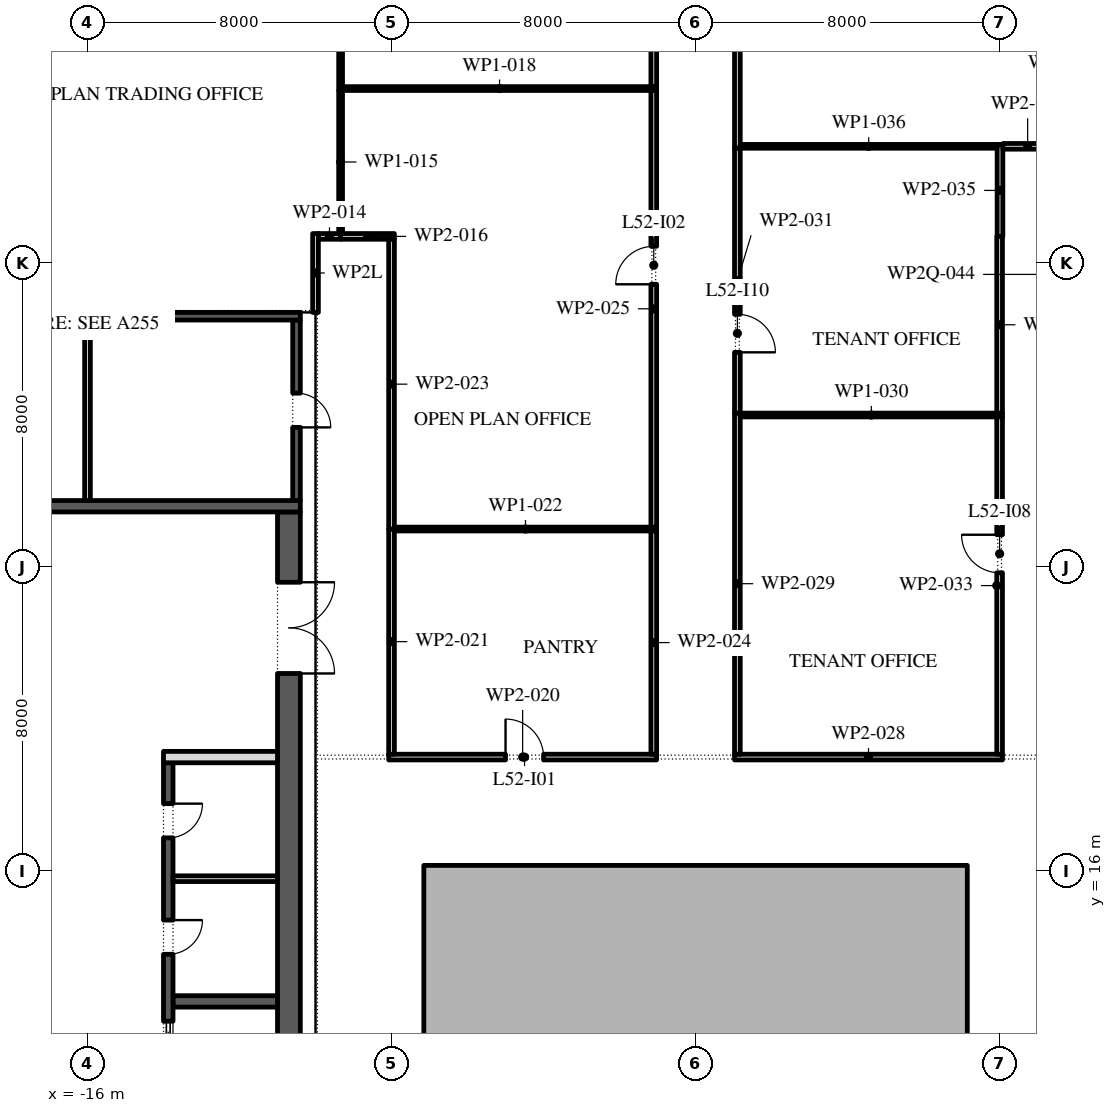
"""IFC4 building model, lengths in metres.
Left out: names, types, materials, properties, quantities, classifications, styles, units other than length and angle.
Written with IfcOpenShell. Run it as: python <this file> out.ifc"""

import sys

from ifc_helpers import new_model, si_unit, direction, frame, frame_2d, origin, place, context, subcontext, project, spatial, polyline, rectangle, outline, extrude, element, fill, save


model = new_model("IFC4")
c1 = context("Model", 3, precision=1e-05, world=origin(), true_north=direction((0.0, 1.0)))
c2 = subcontext(c1, "Body", "Model", "MODEL_VIEW")
j1 = project(units=[si_unit("LENGTHUNIT", "METRE"), si_unit("PLANEANGLEUNIT", "RADIAN")], contexts=[c1])
p1 = place(None, origin())
s1 = spatial("IfcSite", under=j1, at=p1, CompositionType="ELEMENT")
p2 = place(p1, origin())
s2 = spatial("IfcBuilding", under=s1, at=p2, CompositionType="ELEMENT")
p3 = place(p2, frame((0.0, 0.0, 243.0)))
s3 = spatial("IfcBuildingStorey", under=s2, at=p3, CompositionType="ELEMENT", Elevation=243.0)
p4 = place(p3, origin())
e1 = element("IfcWall", 1, at=p4, inside=s3, PredefinedType="STANDARD", context=c2, shape_type="SweptSolid", body=[
    extrude(outline(polyline([(-7.15, -2.15), (7.15, -2.15), (7.15, 16.15), (-7.15, 16.15), (-7.15, -2.15)]), holes=[polyline([(-7.0, -2.0), (-7.0, 16.0), (7.0, 16.0), (7.0, -2.0), (-7.0, -2.0)])]), origin(), (0.0, 0.0, 1.0), 4.0),
])
p5 = place(p3, frame((-10.7, -2.45, 0.0), z_axis=(0.0, 0.0, 1.0), x_axis=(0.0, 1.0, 0.0)))
e2 = element("IfcWall", 2, at=p5, inside=s3, PredefinedType="SHEAR", context=c2, shape_type="SweptSolid", body=[
    extrude(rectangle(XDim=27.9, YDim=0.6, at=frame_2d((13.95, 0.0))), origin(), (0.0, 0.0, 1.0), 4.0),
])
p6 = place(p5, frame((23.65, 0.0, 0.0)))
e3 = element("IfcOpeningElement", 3, at=p6, cuts=e2, PredefinedType="OPENING", context=c2, shape_type="SweptSolid", body=[
    extrude(rectangle(XDim=2.4, YDim=2.1, at=frame_2d((1.2, 1.05))), frame((0.0, 0.31, 0.0), z_axis=(0.0, -1.0, 0.0), x_axis=(1.0, 0.0, 0.0)), (0.0, 0.0, 1.0), 0.62),
])
p7 = place(p5, frame((1.087, 0.0, 0.0)))
e4 = element("IfcOpeningElement", 4, at=p7, cuts=e2, PredefinedType="OPENING", context=c2, shape_type="SweptSolid", body=[
    extrude(rectangle(XDim=0.9, YDim=2.1, at=frame_2d((0.45, 1.05))), frame((0.0, 0.31, 0.0), z_axis=(0.0, -1.0, 0.0), x_axis=(1.0, 0.0, 0.0)), (0.0, 0.0, 1.0), 0.62),
])
p8 = place(p5, frame((4.262, 0.0, 0.0)))
e5 = element("IfcOpeningElement", 5, at=p8, cuts=e2, PredefinedType="OPENING", context=c2, shape_type="SweptSolid", body=[
    extrude(rectangle(XDim=1.0, YDim=2.1, at=frame_2d((0.5, 1.05))), frame((0.0, 0.31, 0.0), z_axis=(0.0, -1.0, 0.0), x_axis=(1.0, 0.0, 0.0)), (0.0, 0.0, 1.0), 0.62),
])
p9 = place(p3, frame((-21.6, 25.6, 0.0), z_axis=(0.0, 0.0, 1.0), x_axis=(1.0, 0.0, 0.0)))
e6 = element("IfcWall", 6, at=p9, inside=s3, PredefinedType="SHEAR", context=c2, shape_type="SweptSolid", body=[
    extrude(rectangle(XDim=11.2, YDim=0.3, at=frame_2d((5.6, 0.0))), origin(), (0.0, 0.0, 1.0), 4.0),
])
p10 = place(p3, frame((-13.75, 12.571, 0.0), z_axis=(0.0, 0.0, 1.0), x_axis=(1.0, 0.0, 0.0)))
e7 = element("IfcWall", 7, at=p10, inside=s3, PredefinedType="SHEAR", context=c2, shape_type="SweptSolid", body=[
    extrude(rectangle(XDim=2.75, YDim=0.3, at=frame_2d((1.375, 0.0))), origin(), (0.0, 0.0, 1.0), 4.0),
])
p11 = place(p3, frame((-13.875, -2.45, 0.0), z_axis=(0.0, 0.0, 1.0), x_axis=(0.0, 1.0, 0.0)))
e8 = element("IfcWall", 8, at=p11, inside=s3, PredefinedType="SHEAR", context=c2, shape_type="SweptSolid", body=[
    extrude(rectangle(XDim=21.3, YDim=0.25, at=frame_2d((10.65, 0.0))), origin(), (0.0, 0.0, 1.0), 4.0),
])
p12 = place(p11, frame((16.261, 0.0, 0.0)))
e9 = element("IfcOpeningElement", 9, at=p12, cuts=e8, PredefinedType="OPENING", context=c2, shape_type="SweptSolid", body=[
    extrude(rectangle(XDim=0.9, YDim=2.1, at=frame_2d((0.45, 1.05))), frame((0.0, 0.135, 0.0), z_axis=(0.0, -1.0, 0.0), x_axis=(1.0, 0.0, 0.0)), (0.0, 0.0, 1.0), 0.27),
])
p13 = place(p11, frame((19.325, 0.0, 0.0)))
e10 = element("IfcOpeningElement", 10, at=p13, cuts=e8, PredefinedType="OPENING", context=c2, shape_type="SweptSolid", body=[
    extrude(rectangle(XDim=0.9, YDim=2.1, at=frame_2d((0.45, 1.05))), frame((0.0, 0.135, 0.0), z_axis=(0.0, -1.0, 0.0), x_axis=(1.0, 0.0, 0.0)), (0.0, 0.0, 1.0), 0.27),
])
p14 = place(p11, frame((6.971, 0.0, 0.0)))
e11 = element("IfcOpeningElement", 11, at=p14, cuts=e8, PredefinedType="OPENING", context=c2, shape_type="SweptSolid", body=[
    extrude(rectangle(XDim=1.1, YDim=2.1, at=frame_2d((0.55, 1.05))), frame((0.0, 0.135, 0.0), z_axis=(0.0, -1.0, 0.0), x_axis=(1.0, 0.0, 0.0)), (0.0, 0.0, 1.0), 0.27),
])
p15 = place(p11, frame((9.114, 0.0, 0.0)))
e12 = element("IfcOpeningElement", 12, at=p15, cuts=e8, PredefinedType="OPENING", context=c2, shape_type="SweptSolid", body=[
    extrude(rectangle(XDim=1.1, YDim=2.1, at=frame_2d((0.55, 1.05))), frame((0.0, 0.135, 0.0), z_axis=(0.0, -1.0, 0.0), x_axis=(1.0, 0.0, 0.0)), (0.0, 0.0, 1.0), 0.27),
])
p16 = place(p11, frame((11.257, 0.0, 0.0)))
e13 = element("IfcOpeningElement", 13, at=p16, cuts=e8, PredefinedType="OPENING", context=c2, shape_type="SweptSolid", body=[
    extrude(rectangle(XDim=1.1, YDim=2.1, at=frame_2d((0.55, 1.05))), frame((0.0, 0.135, 0.0), z_axis=(0.0, -1.0, 0.0), x_axis=(1.0, 0.0, 0.0)), (0.0, 0.0, 1.0), 0.27),
])
p17 = place(p11, frame((13.4, 0.0, 0.0)))
e14 = element("IfcOpeningElement", 14, at=p17, cuts=e8, PredefinedType="OPENING", context=c2, shape_type="SweptSolid", body=[
    extrude(rectangle(XDim=1.1, YDim=2.1, at=frame_2d((0.55, 1.05))), frame((0.0, 0.135, 0.0), z_axis=(0.0, -1.0, 0.0), x_axis=(1.0, 0.0, 0.0)), (0.0, 0.0, 1.0), 0.27),
])
p18 = place(p3, frame((-14.0, 19.0, 0.0), z_axis=(0.0, 0.0, 1.0), x_axis=(1.0, 0.0, 0.0)))
e15 = element("IfcWall", 15, at=p18, inside=s3, PredefinedType="PARTITIONING", context=c2, shape_type="SweptSolid", body=[
    extrude(rectangle(XDim=3.0, YDim=0.3, at=frame_2d((1.5, 0.0))), origin(), (0.0, 0.0, 1.0), 4.0),
])
p19 = place(p3, frame((-13.75, 15.8, 0.0), z_axis=(0.0, 0.0, 1.0), x_axis=(1.0, 0.0, 0.0)))
e16 = element("IfcWall", 16, at=p19, inside=s3, PredefinedType="PARTITIONING", context=c2, shape_type="SweptSolid", body=[
    extrude(rectangle(XDim=2.75, YDim=0.15, at=frame_2d((1.375, 0.0))), origin(), (0.0, 0.0, 1.0), 4.0),
])
p20 = place(p3, frame((-10.5, 25.75, 0.0), z_axis=(0.0, 0.0, 1.0), x_axis=(0.0, 1.0, 0.0)))
e17 = element("IfcWall", 17, at=p20, inside=s3, PredefinedType="SHEAR", context=c2, shape_type="SweptSolid", body=[
    extrude(rectangle(XDim=4.75, YDim=0.2, at=frame_2d((2.375, 0.0))), origin(), (0.0, 0.0, 1.0), 4.0),
])
p21 = place(p20, frame((1.925, 0.0, 0.0)))
e18 = element("IfcOpeningElement", 18, at=p21, cuts=e17, PredefinedType="OPENING", context=c2, shape_type="SweptSolid", body=[
    extrude(rectangle(XDim=0.9, YDim=2.1, at=frame_2d((0.45, 1.05))), frame((0.0, 0.11, 0.0), z_axis=(0.0, -1.0, 0.0), x_axis=(1.0, 0.0, 0.0)), (0.0, 0.0, 1.0), 0.22),
])
p22 = place(p3, frame((-21.6, 30.6, 0.0), z_axis=(0.0, 0.0, 1.0), x_axis=(1.0, 0.0, 0.0)))
e19 = element("IfcWall", 19, at=p22, inside=s3, PredefinedType="SHEAR", context=c2, shape_type="SweptSolid", body=[
    extrude(rectangle(XDim=11.2, YDim=0.2, at=frame_2d((5.6, 0.0))), origin(), (0.0, 0.0, 1.0), 4.0),
])
p23 = place(p3, frame((-16.0, 25.75, 0.0), z_axis=(0.0, 0.0, 1.0), x_axis=(0.0, 1.0, 0.0)))
e20 = element("IfcWall", 20, at=p23, inside=s3, PredefinedType="PARTITIONING", context=c2, shape_type="SweptSolid", body=[
    extrude(rectangle(XDim=4.75, YDim=0.15, at=frame_2d((2.375, 0.0))), origin(), (0.0, 0.0, 1.0), 4.0),
])
p24 = place(p3, frame((-10.0, 30.7, 0.0), z_axis=(0.0, 0.0, 1.0), x_axis=(0.0, 1.0, 0.0)))
e21 = element("IfcWall", 21, at=p24, inside=s3, PredefinedType="PARTITIONING", context=c2, shape_type="SweptSolid", body=[
    extrude(rectangle(XDim=2.075, YDim=0.15, at=frame_2d((1.038, 0.0))), origin(), (0.0, 0.0, 1.0), 3.02),
])
p25 = place(p3, frame((-9.925, 32.7, 0.0), z_axis=(0.0, 0.0, 1.0), x_axis=(1.0, 0.0, 0.0)))
e22 = element("IfcWall", 22, at=p25, inside=s3, PredefinedType="PARTITIONING", context=c2, shape_type="SweptSolid", body=[
    extrude(rectangle(XDim=0.585, YDim=0.15, at=frame_2d((0.292, 0.0))), origin(), (0.0, 0.0, 1.0), 4.0),
])
p26 = place(p3, frame((-9.34, 32.775, 0.0), z_axis=(0.0, 0.0, 1.0), x_axis=(0.0, 1.0, 0.0)))
e23 = element("IfcWall", 23, at=p26, inside=s3, PredefinedType="PARTITIONING", context=c2, shape_type="SweptSolid", body=[
    extrude(rectangle(XDim=3.765, YDim=0.1, at=frame_2d((1.883, 0.0))), origin(), (0.0, 0.0, 1.0), 4.0),
])
p27 = place(p3, frame((-9.34, 32.7, 0.0), z_axis=(0.0, 0.0, 1.0), x_axis=(1.0, 0.0, 0.0)))
e24 = element("IfcWall", 24, at=p27, inside=s3, PredefinedType="PARTITIONING", context=c2, shape_type="SweptSolid", body=[
    extrude(rectangle(XDim=1.415, YDim=0.15, at=frame_2d((0.708, 0.0))), origin(), (0.0, 0.0, 1.0), 4.0),
])
p28 = place(p3, frame((-9.34, 36.54, 0.0), z_axis=(0.0, 0.0, 1.0), x_axis=(0.0, 1.0, 0.0)))
e25 = element("IfcWall", 25, at=p28, inside=s3, PredefinedType="PARTITIONING", context=c2, shape_type="SweptSolid", body=[
    extrude(rectangle(XDim=5.41, YDim=0.1, at=frame_2d((2.705, 0.0))), origin(), (0.0, 0.0, 1.0), 4.0),
])
p29 = place(p3, frame((-9.29, 36.59, 0.0), z_axis=(0.0, 0.0, 1.0), x_axis=(1.0, 0.0, 0.0)))
e26 = element("IfcWall", 26, at=p29, inside=s3, PredefinedType="PARTITIONING", context=c2, shape_type="SweptSolid", body=[
    extrude(rectangle(XDim=8.265, YDim=0.1, at=frame_2d((4.133, 0.0))), origin(), (0.0, 0.0, 1.0), 4.0),
])
p30 = place(p3, frame((-8.075, 19.0, 0.0), z_axis=(0.0, 0.0, 1.0), x_axis=(1.0, 0.0, 0.0)))
e27 = element("IfcWall", 27, at=p30, inside=s3, PredefinedType="PARTITIONING", context=c2, shape_type="SweptSolid", body=[
    extrude(rectangle(XDim=7.05, YDim=0.15, at=frame_2d((3.525, 0.0))), origin(), (0.0, 0.0, 1.0), 4.0),
])
p31 = place(p30, frame((3.075, 0.0, 0.0)))
e28 = element("IfcOpeningElement", 28, at=p31, cuts=e27, PredefinedType="OPENING", context=c2, shape_type="SweptSolid", body=[
    extrude(rectangle(XDim=1.0, YDim=2.1, at=frame_2d((0.5, 1.05))), frame((0.0, 0.085, 0.0), z_axis=(0.0, -1.0, 0.0), x_axis=(1.0, 0.0, 0.0)), (0.0, 0.0, 1.0), 0.17),
])
p32 = place(p3, frame((-8.0, 25.0, 0.0), z_axis=(0.0, 0.0, 1.0), x_axis=(0.0, -1.0, 0.0)))
e29 = element("IfcWall", 29, at=p32, inside=s3, PredefinedType="PARTITIONING", context=c2, shape_type="SweptSolid", body=[
    extrude(rectangle(XDim=5.925, YDim=0.15, at=frame_2d((2.962, 0.0))), origin(), (0.0, 0.0, 1.0), 4.0),
])
p33 = place(p3, frame((-7.925, 25.0, 0.0), z_axis=(0.0, 0.0, 1.0), x_axis=(1.0, 0.0, 0.0)))
e30 = element("IfcWall", 30, at=p33, inside=s3, PredefinedType="PARTITIONING", context=c2, shape_type="SweptSolid", body=[
    extrude(rectangle(XDim=6.9, YDim=0.1, at=frame_2d((3.45, 0.0))), origin(), (0.0, 0.0, 1.0), 4.0),
])
p34 = place(p3, frame((-8.0, 32.625, 0.0), z_axis=(0.0, 0.0, 1.0), x_axis=(0.0, -1.0, 0.0)))
e31 = element("IfcWall", 31, at=p34, inside=s3, PredefinedType="PARTITIONING", context=c2, shape_type="SweptSolid", body=[
    extrude(rectangle(XDim=7.625, YDim=0.15, at=frame_2d((3.812, 0.0))), origin(), (0.0, 0.0, 1.0), 4.0),
])
p35 = place(p3, frame((-1.1, 19.075, 0.0), z_axis=(0.0, 0.0, 1.0), x_axis=(0.0, 1.0, 0.0)))
e32 = element("IfcWall", 32, at=p35, inside=s3, PredefinedType="PARTITIONING", context=c2, shape_type="SweptSolid", body=[
    extrude(rectangle(XDim=5.875, YDim=0.15, at=frame_2d((2.938, 0.0))), origin(), (0.0, 0.0, 1.0), 4.0),
])
p36 = place(p3, frame((-1.1, 25.05, 0.0), z_axis=(0.0, 0.0, 1.0), x_axis=(0.0, 1.0, 0.0)))
e33 = element("IfcWall", 33, at=p36, inside=s3, PredefinedType="PARTITIONING", context=c2, shape_type="SweptSolid", body=[
    extrude(rectangle(XDim=11.49, YDim=0.15, at=frame_2d((5.745, 0.0))), origin(), (0.0, 0.0, 1.0), 4.0),
])
p37 = place(p36, frame((6.39, 0.0, 0.0)))
e34 = element("IfcOpeningElement", 34, at=p37, cuts=e33, PredefinedType="OPENING", context=c2, shape_type="SweptSolid", body=[
    extrude(rectangle(XDim=1.0, YDim=2.1, at=frame_2d((0.5, 1.05))), frame((0.0, 0.085, 0.0), z_axis=(0.0, -1.0, 0.0), x_axis=(1.0, 0.0, 0.0)), (0.0, 0.0, 1.0), 0.17),
])
p38 = place(p3, frame((-1.1, 36.64, 0.0), z_axis=(0.0, 0.0, 1.0), x_axis=(0.0, 1.0, 0.0)))
e35 = element("IfcWall", 35, at=p38, inside=s3, PredefinedType="PARTITIONING", context=c2, shape_type="SweptSolid", body=[
    extrude(rectangle(XDim=11.138, YDim=0.15, at=frame_2d((5.569, 0.0))), origin(), (0.0, 0.0, 1.0), 4.0),
])
p39 = place(p38, frame((6.21, 0.0, 0.0)))
e36 = element("IfcOpeningElement", 36, at=p39, cuts=e35, PredefinedType="OPENING", context=c2, shape_type="SweptSolid", body=[
    extrude(rectangle(XDim=1.0, YDim=2.1, at=frame_2d((0.5, 1.05))), frame((0.0, 0.085, 0.0), z_axis=(0.0, -1.0, 0.0), x_axis=(1.0, 0.0, 0.0)), (0.0, 0.0, 1.0), 0.17),
])
p40 = place(p3, frame((1.025, 19.0, 0.0), z_axis=(0.0, 0.0, 1.0), x_axis=(1.0, 0.0, 0.0)))
e37 = element("IfcWall", 37, at=p40, inside=s3, PredefinedType="PARTITIONING", context=c2, shape_type="SweptSolid", body=[
    extrude(rectangle(XDim=7.05, YDim=0.15, at=frame_2d((3.525, 0.0))), origin(), (0.0, 0.0, 1.0), 4.0),
])
p41 = place(p3, frame((1.1, 28.05, 0.0), z_axis=(0.0, 0.0, 1.0), x_axis=(0.0, -1.0, 0.0)))
e38 = element("IfcWall", 38, at=p41, inside=s3, PredefinedType="PARTITIONING", context=c2, shape_type="SweptSolid", body=[
    extrude(rectangle(XDim=8.975, YDim=0.15, at=frame_2d((4.488, 0.0))), origin(), (0.0, 0.0, 1.0), 4.0),
])
p42 = place(p3, frame((1.175, 28.0, 0.0), z_axis=(0.0, 0.0, 1.0), x_axis=(1.0, 0.0, 0.0)))
e39 = element("IfcWall", 39, at=p42, inside=s3, PredefinedType="PARTITIONING", context=c2, shape_type="SweptSolid", body=[
    extrude(rectangle(XDim=6.9, YDim=0.1, at=frame_2d((3.45, 0.0))), origin(), (0.0, 0.0, 1.0), 4.0),
])
p43 = place(p3, frame((1.1, 35.02, 0.0), z_axis=(0.0, 0.0, 1.0), x_axis=(0.0, -1.0, 0.0)))
e40 = element("IfcWall", 40, at=p43, inside=s3, PredefinedType="PARTITIONING", context=c2, shape_type="SweptSolid", body=[
    extrude(rectangle(XDim=6.97, YDim=0.15, at=frame_2d((3.485, 0.0))), origin(), (0.0, 0.0, 1.0), 4.0),
])
p44 = place(p43, frame((4.37, 0.0, 0.0)))
e41 = element("IfcOpeningElement", 41, at=p44, cuts=e40, PredefinedType="OPENING", context=c2, shape_type="SweptSolid", body=[
    extrude(rectangle(XDim=1.0, YDim=2.1, at=frame_2d((0.5, 1.05))), frame((0.0, 0.085, 0.0), z_axis=(0.0, -1.0, 0.0), x_axis=(1.0, 0.0, 0.0)), (0.0, 0.0, 1.0), 0.17),
])
p45 = place(p3, frame((1.1, 47.27, 0.0), z_axis=(0.0, 0.0, 1.0), x_axis=(0.0, -1.0, 0.0)))
e42 = element("IfcWall", 42, at=p45, inside=s3, PredefinedType="PARTITIONING", context=c2, shape_type="SweptSolid", body=[
    extrude(rectangle(XDim=12.25, YDim=0.15, at=frame_2d((6.125, 0.0))), origin(), (0.0, 0.0, 1.0), 4.0),
])
p46 = place(p45, frame((8.05, 0.0, 0.0)))
e43 = element("IfcOpeningElement", 43, at=p46, cuts=e42, PredefinedType="OPENING", context=c2, shape_type="SweptSolid", body=[
    extrude(rectangle(XDim=1.0, YDim=2.1, at=frame_2d((0.5, 1.05))), frame((0.0, 0.085, 0.0), z_axis=(0.0, -1.0, 0.0), x_axis=(1.0, 0.0, 0.0)), (0.0, 0.0, 1.0), 0.17),
])
p47 = place(p3, frame((8.0, 19.075, 0.0), z_axis=(0.0, 0.0, 1.0), x_axis=(0.0, 1.0, 0.0)))
e44 = element("IfcWall", 44, at=p47, inside=s3, PredefinedType="PARTITIONING", context=c2, shape_type="SweptSolid", body=[
    extrude(rectangle(XDim=8.875, YDim=0.15, at=frame_2d((4.438, 0.0))), origin(), (0.0, 0.0, 1.0), 4.0),
])
p48 = place(p47, frame((4.775, 0.0, 0.0)))
e45 = element("IfcOpeningElement", 45, at=p48, cuts=e44, PredefinedType="OPENING", context=c2, shape_type="SweptSolid", body=[
    extrude(rectangle(XDim=1.0, YDim=2.1, at=frame_2d((0.5, 1.05))), frame((0.0, 0.085, 0.0), z_axis=(0.0, -1.0, 0.0), x_axis=(1.0, 0.0, 0.0)), (0.0, 0.0, 1.0), 0.17),
])
p49 = place(p3, frame((8.0, 28.05, 0.0), z_axis=(0.0, 0.0, 1.0), x_axis=(0.0, 1.0, 0.0)))
e46 = element("IfcWall", 46, at=p49, inside=s3, PredefinedType="PARTITIONING", context=c2, shape_type="SweptSolid", body=[
    extrude(rectangle(XDim=4.65, YDim=0.15, at=frame_2d((2.325, 0.0))), origin(), (0.0, 0.0, 1.0), 4.0),
])
p50 = place(p3, frame((8.01, 32.7, 0.0), z_axis=(0.0, 0.0, 1.0), x_axis=(0.0, 1.0, 0.0)))
e47 = element("IfcWall", 47, at=p50, inside=s3, PredefinedType="PARTITIONING", context=c2, shape_type="SweptSolid", body=[
    extrude(rectangle(XDim=2.42, YDim=0.15, at=frame_2d((1.21, 0.0))), origin(), (0.0, 0.0, 1.0), 4.0),
])
p51 = place(p3, frame((7.935, 35.07, 0.0), z_axis=(0.0, 0.0, 1.0), x_axis=(-1.0, 0.0, 0.0)))
e48 = element("IfcWall", 48, at=p51, inside=s3, PredefinedType="PARTITIONING", context=c2, shape_type="SweptSolid", body=[
    extrude(rectangle(XDim=6.76, YDim=0.1, at=frame_2d((3.38, 0.0))), origin(), (0.0, 0.0, 1.0), 4.0),
])
p52 = place(p3, frame((8.085, 35.07, 0.0), z_axis=(0.0, 0.0, 1.0), x_axis=(1.0, 0.0, 0.0)))
e49 = element("IfcWall", 49, at=p52, inside=s3, PredefinedType="PARTITIONING", context=c2, shape_type="SweptSolid", body=[
    extrude(rectangle(XDim=1.305, YDim=0.15, at=frame_2d((0.652, 0.0))), origin(), (0.0, 0.0, 1.0), 4.0),
])
p53 = place(p12, frame((0.9, -0.2, 0.0), z_axis=(0.0, 0.0, 1.0), x_axis=(-1.0, 0.0, 0.0)))
e50 = element("IfcDoor", 50, at=p53, inside=s3, OperationType="SINGLE_SWING_RIGHT", PredefinedType="DOOR", context=c2, shape_type="SweptSolid", body=[
    extrude(rectangle(XDim=0.9, YDim=2.1, at=frame_2d((0.45, 1.05))), frame((0.0, -0.075, 0.0), z_axis=(0.0, -1.0, 0.0), x_axis=(1.0, 0.0, 0.0)), (0.0, 0.0, 1.0), 0.05),
])
fill(e9, e50)
p54 = place(p13, frame((0.9, -0.2, 0.0), z_axis=(0.0, 0.0, 1.0), x_axis=(-1.0, 0.0, 0.0)))
e51 = element("IfcDoor", 51, at=p54, inside=s3, OperationType="SINGLE_SWING_RIGHT", PredefinedType="DOOR", context=c2, shape_type="SweptSolid", body=[
    extrude(rectangle(XDim=0.9, YDim=2.1, at=frame_2d((0.45, 1.05))), frame((0.0, -0.075, 0.0), z_axis=(0.0, -1.0, 0.0), x_axis=(1.0, 0.0, 0.0)), (0.0, 0.0, 1.0), 0.05),
])
fill(e10, e51)
p55 = place(p17, origin())
e52 = element("IfcDoor", 52, at=p55, inside=s3, OperationType="SLIDING_TO_LEFT", PredefinedType="DOOR", context=c2, shape_type="SweptSolid", body=[
    extrude(rectangle(XDim=1.1, YDim=2.1, at=frame_2d((0.55, 1.05))), frame((0.0, 0.025, 0.0), z_axis=(0.0, -1.0, 0.0), x_axis=(1.0, 0.0, 0.0)), (0.0, 0.0, 1.0), 0.05),
])
fill(e14, e52)
p56 = place(p6, frame((2.4, 0.0, 0.0), z_axis=(0.0, 0.0, 1.0), x_axis=(-1.0, 0.0, 0.0)))
e53 = element("IfcDoor", 53, at=p56, inside=s3, OperationType="DOUBLE_DOOR_SINGLE_SWING", PredefinedType="DOOR", context=c2, shape_type="SweptSolid", body=[
    extrude(rectangle(XDim=2.4, YDim=2.1, at=frame_2d((1.2, 1.05))), frame((0.0, 0.025, 0.0), z_axis=(0.0, -1.0, 0.0), x_axis=(1.0, 0.0, 0.0)), (0.0, 0.0, 1.0), 0.05),
])
fill(e3, e53)
p57 = place(p21, frame((0.9, 0.15, 0.0), z_axis=(0.0, 0.0, 1.0), x_axis=(-1.0, 0.0, 0.0)))
e54 = element("IfcDoor", 54, at=p57, inside=s3, OperationType="SINGLE_SWING_LEFT", PredefinedType="DOOR", context=c2, shape_type="SweptSolid", body=[
    extrude(rectangle(XDim=0.9, YDim=2.1, at=frame_2d((0.45, 1.05))), frame((0.0, 0.1, 0.0), z_axis=(0.0, -1.0, 0.0), x_axis=(1.0, 0.0, 0.0)), (0.0, 0.0, 1.0), 0.05),
])
fill(e18, e54)
p58 = place(p31, origin())
e55 = element("IfcDoor", 55, at=p58, inside=s3, OperationType="SINGLE_SWING_RIGHT", PredefinedType="DOOR", context=c2, shape_type="SweptSolid", body=[
    extrude(rectangle(XDim=1.0, YDim=2.1, at=frame_2d((0.5, 1.05))), frame((0.0, 0.025, 0.0), z_axis=(0.0, -1.0, 0.0), x_axis=(1.0, 0.0, 0.0)), (0.0, 0.0, 1.0), 0.05),
])
fill(e28, e55)
p59 = place(p37, origin())
e56 = element("IfcDoor", 56, at=p59, inside=s3, OperationType="SINGLE_SWING_RIGHT", PredefinedType="DOOR", context=c2, shape_type="SweptSolid", body=[
    extrude(rectangle(XDim=1.0, YDim=2.1, at=frame_2d((0.5, 1.05))), frame((0.0, 0.025, 0.0), z_axis=(0.0, -1.0, 0.0), x_axis=(1.0, 0.0, 0.0)), (0.0, 0.0, 1.0), 0.05),
])
fill(e34, e56)
p60 = place(p48, origin())
e57 = element("IfcDoor", 57, at=p60, inside=s3, OperationType="SINGLE_SWING_LEFT", PredefinedType="DOOR", context=c2, shape_type="SweptSolid", body=[
    extrude(rectangle(XDim=1.0, YDim=2.1, at=frame_2d((0.5, 1.05))), frame((0.0, 0.025, 0.0), z_axis=(0.0, -1.0, 0.0), x_axis=(1.0, 0.0, 0.0)), (0.0, 0.0, 1.0), 0.05),
])
fill(e45, e57)
p61 = place(p44, origin())
e58 = element("IfcDoor", 58, at=p61, inside=s3, OperationType="SINGLE_SWING_LEFT", PredefinedType="DOOR", context=c2, shape_type="SweptSolid", body=[
    extrude(rectangle(XDim=1.0, YDim=2.1, at=frame_2d((0.5, 1.05))), frame((0.0, 0.025, 0.0), z_axis=(0.0, -1.0, 0.0), x_axis=(1.0, 0.0, 0.0)), (0.0, 0.0, 1.0), 0.05),
])
fill(e41, e58)
save(model, sys.argv[1])
